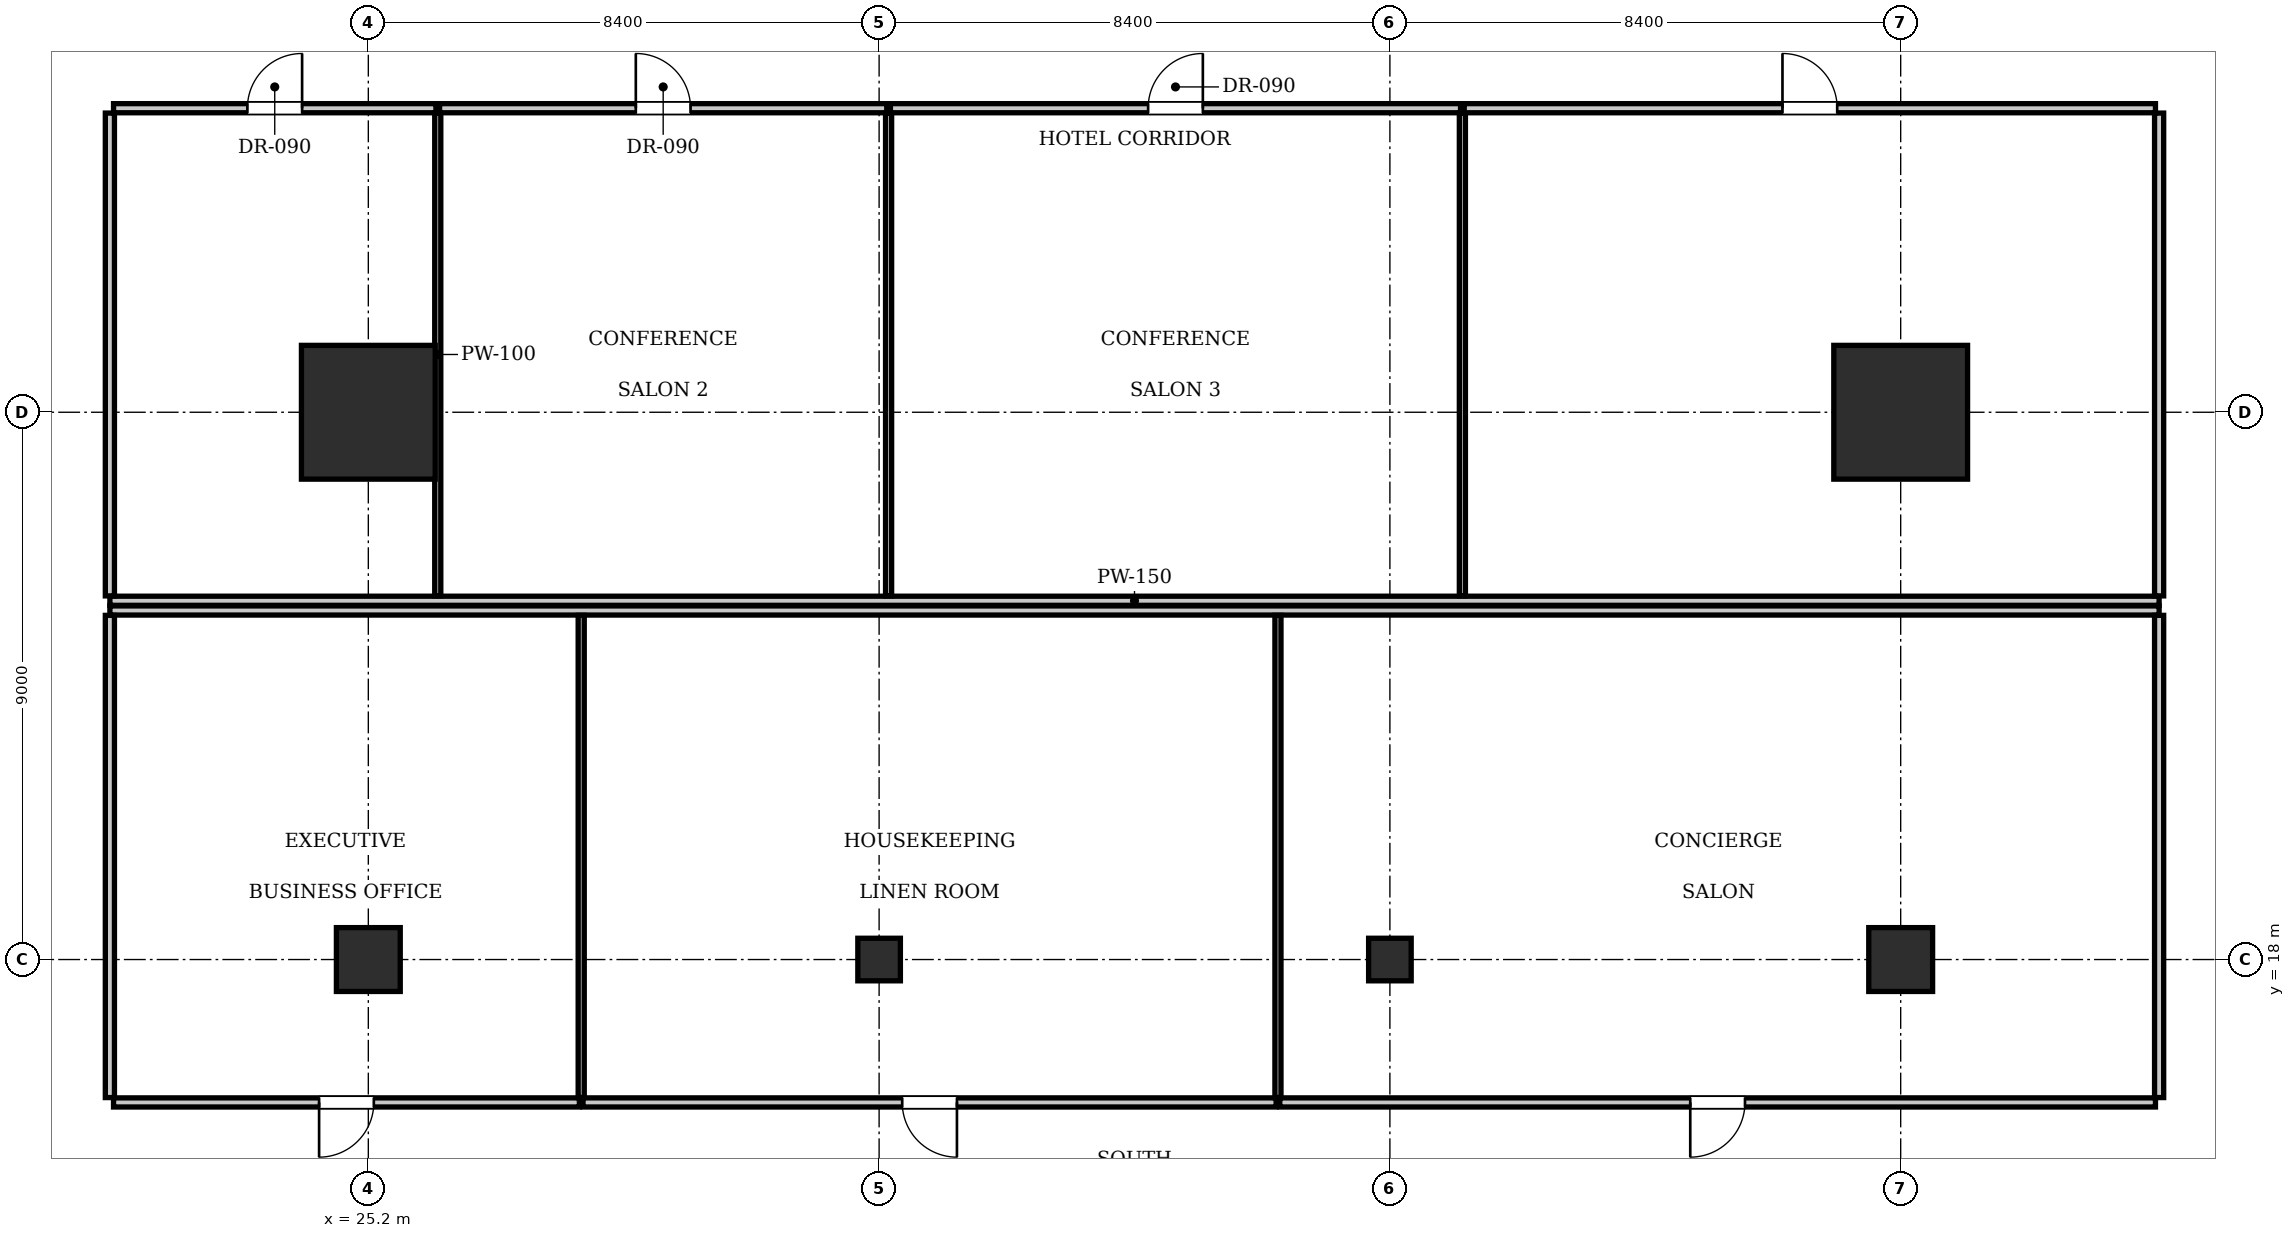
"""IFC4 building model, lengths in metres.
Left out: names, types, materials, properties, quantities, classifications, styles, units other than length and angle.
Written with IfcOpenShell. Run it as: python <this file> out.ifc"""

import sys

from ifc_helpers import new_model, si_unit, direction, frame, frame_2d, origin, origin_2d, place, context, subcontext, project, spatial, rectangle, i_section, extrude, element, fill, save


model = new_model("IFC4")
c1 = context("Model", 3, precision=1e-05, world=origin(), true_north=direction((0.0, 1.0)))
c2 = subcontext(c1, "Body", "Model", "MODEL_VIEW")
j1 = project(units=[si_unit("LENGTHUNIT", "METRE"), si_unit("PLANEANGLEUNIT", "RADIAN")], contexts=[c1])
p1 = place(None, origin())
s1 = spatial("IfcSite", under=j1, at=p1, CompositionType="ELEMENT")
p2 = place(p1, origin())
s2 = spatial("IfcBuilding", under=s1, at=p2, CompositionType="ELEMENT")
p3 = place(p2, frame((0.0, 0.0, 53.9)))
s3 = spatial("IfcBuildingStorey", under=s2, at=p3, CompositionType="ELEMENT", Elevation=53.9)
for number, where, z_axis, x_axis in (
    (1, (25.2, 27.0, 0.0), (0.0, 0.0, 1.0), (1.0, 0.0, 0.0)),
    (2, (50.4, 27.0, 0.0), (0.0, 0.0, 1.0), (1.0, 0.0, 0.0)),
):
    element("IfcColumn", number, at=place(p3, frame(where, z_axis=z_axis, x_axis=x_axis)), inside=s3, PredefinedType="COLUMN", context=c2, shape_type="SweptSolid", body=[
        extrude(rectangle(XDim=2.2, YDim=2.2, at=origin_2d()), origin(), (0.0, 0.0, 1.0), 3.85),
    ])
for number, where, z_axis, x_axis in (
    (3, (25.2, 18.0, 0.0), (0.0, 0.0, 1.0), (1.0, 0.0, 0.0)),
    (4, (50.4, 18.0, 0.0), (0.0, 0.0, 1.0), (1.0, 0.0, 0.0)),
):
    element("IfcColumn", number, at=place(p3, frame(where, z_axis=z_axis, x_axis=x_axis)), inside=s3, PredefinedType="COLUMN", context=c2, shape_type="SweptSolid", body=[
        extrude(rectangle(XDim=1.05, YDim=1.05, at=origin_2d()), origin(), (0.0, 0.0, 1.0), 3.85),
    ])
for number, where, z_axis, x_axis in (
    (5, (33.6, 18.0, 0.0), (0.0, 0.0, 1.0), (1.0, 0.0, 0.0)),
    (6, (42.0, 18.0, 0.0), (0.0, 0.0, 1.0), (1.0, 0.0, 0.0)),
):
    element("IfcColumn", number, at=place(p3, frame(where, z_axis=z_axis, x_axis=x_axis)), inside=s3, PredefinedType="COLUMN", context=c2, shape_type="SweptSolid", body=[
        extrude(i_section(OverallWidth=0.7, OverallDepth=0.7, WebThickness=0.028, FlangeThickness=0.044, at=origin_2d()), origin(), (0.0, 0.0, 1.0), 3.85),
    ])
p4 = place(p3, frame((20.95, 23.9, 0.0), z_axis=(0.0, 0.0, 1.0), x_axis=(1.0, 0.0, 0.0)))
e7 = element("IfcWall", 7, at=p4, inside=s3, PredefinedType="PARTITIONING", context=c2, shape_type="SweptSolid", body=[
    extrude(rectangle(XDim=33.7, YDim=0.15, at=frame_2d((16.85, 0.0))), origin(), (0.0, 0.0, 1.0), 3.61),
])
p5 = place(p3, frame((20.95, 23.98, 0.0), z_axis=(0.0, 0.0, 1.0), x_axis=(0.0, 1.0, 0.0)))
e8 = element("IfcWall", 8, at=p5, inside=s3, PredefinedType="PARTITIONING", context=c2, shape_type="SweptSolid", body=[
    extrude(rectangle(XDim=7.94, YDim=0.15, at=frame_2d((3.97, 0.0))), origin(), (0.0, 0.0, 1.0), 3.207),
])
p6 = place(p3, frame((54.65, 23.98, 0.0), z_axis=(0.0, 0.0, 1.0), x_axis=(0.0, 1.0, 0.0)))
e9 = element("IfcWall", 9, at=p6, inside=s3, PredefinedType="PARTITIONING", context=c2, shape_type="SweptSolid", body=[
    extrude(rectangle(XDim=7.94, YDim=0.15, at=frame_2d((3.97, 0.0))), origin(), (0.0, 0.0, 1.0), 3.255),
])
p7 = place(p3, frame((21.01, 32.0, 0.0), z_axis=(0.0, 0.0, 1.0), x_axis=(1.0, 0.0, 0.0)))
e10 = element("IfcWall", 10, at=p7, inside=s3, PredefinedType="PARTITIONING", context=c2, shape_type="SweptSolid", body=[
    extrude(rectangle(XDim=5.302, YDim=0.15, at=frame_2d((2.651, 0.0))), origin(), (0.0, 0.0, 1.0), 3.61),
])
p8 = place(p7, frame((2.201, 0.0, 0.0)))
e11 = element("IfcOpeningElement", 11, at=p8, cuts=e10, PredefinedType="OPENING", context=c2, shape_type="SweptSolid", body=[
    extrude(rectangle(XDim=0.9, YDim=2.1, at=frame_2d((0.45, 1.05))), frame((0.0, 0.085, 0.0), z_axis=(0.0, -1.0, 0.0), x_axis=(1.0, 0.0, 0.0)), (0.0, 0.0, 1.0), 0.17),
])
p9 = place(p3, frame((26.342, 23.98, 0.0), z_axis=(0.0, 0.0, 1.0), x_axis=(0.0, 1.0, 0.0)))
e12 = element("IfcWall", 12, at=p9, inside=s3, PredefinedType="PARTITIONING", context=c2, shape_type="SweptSolid", body=[
    extrude(rectangle(XDim=7.94, YDim=0.1, at=frame_2d((3.97, 0.0))), origin(), (0.0, 0.0, 1.0), 3.61),
])
p10 = place(p3, frame((26.372, 32.0, 0.0), z_axis=(0.0, 0.0, 1.0), x_axis=(1.0, 0.0, 0.0)))
e13 = element("IfcWall", 13, at=p10, inside=s3, PredefinedType="PARTITIONING", context=c2, shape_type="SweptSolid", body=[
    extrude(rectangle(XDim=7.354, YDim=0.15, at=frame_2d((3.677, 0.0))), origin(), (0.0, 0.0, 1.0), 3.61),
])
p11 = place(p10, frame((3.227, 0.0, 0.0)))
e14 = element("IfcOpeningElement", 14, at=p11, cuts=e13, PredefinedType="OPENING", context=c2, shape_type="SweptSolid", body=[
    extrude(rectangle(XDim=0.9, YDim=2.1, at=frame_2d((0.45, 1.05))), frame((0.0, 0.085, 0.0), z_axis=(0.0, -1.0, 0.0), x_axis=(1.0, 0.0, 0.0)), (0.0, 0.0, 1.0), 0.17),
])
p12 = place(p3, frame((33.756, 23.98, 0.0), z_axis=(0.0, 0.0, 1.0), x_axis=(0.0, 1.0, 0.0)))
e15 = element("IfcWall", 15, at=p12, inside=s3, PredefinedType="PARTITIONING", context=c2, shape_type="SweptSolid", body=[
    extrude(rectangle(XDim=7.94, YDim=0.1, at=frame_2d((3.97, 0.0))), origin(), (0.0, 0.0, 1.0), 2.988),
])
p13 = place(p3, frame((33.786, 32.0, 0.0), z_axis=(0.0, 0.0, 1.0), x_axis=(1.0, 0.0, 0.0)))
e16 = element("IfcWall", 16, at=p13, inside=s3, PredefinedType="PARTITIONING", context=c2, shape_type="SweptSolid", body=[
    extrude(rectangle(XDim=9.376, YDim=0.15, at=frame_2d((4.688, 0.0))), origin(), (0.0, 0.0, 1.0), 3.61),
])
p14 = place(p13, frame((4.238, 0.0, 0.0)))
e17 = element("IfcOpeningElement", 17, at=p14, cuts=e16, PredefinedType="OPENING", context=c2, shape_type="SweptSolid", body=[
    extrude(rectangle(XDim=0.9, YDim=2.1, at=frame_2d((0.45, 1.05))), frame((0.0, 0.085, 0.0), z_axis=(0.0, -1.0, 0.0), x_axis=(1.0, 0.0, 0.0)), (0.0, 0.0, 1.0), 0.17),
])
p15 = place(p3, frame((43.192, 23.98, 0.0), z_axis=(0.0, 0.0, 1.0), x_axis=(0.0, 1.0, 0.0)))
e18 = element("IfcWall", 18, at=p15, inside=s3, PredefinedType="PARTITIONING", context=c2, shape_type="SweptSolid", body=[
    extrude(rectangle(XDim=7.94, YDim=0.1, at=frame_2d((3.97, 0.0))), origin(), (0.0, 0.0, 1.0), 3.61),
])
p16 = place(p3, frame((43.222, 32.0, 0.0), z_axis=(0.0, 0.0, 1.0), x_axis=(1.0, 0.0, 0.0)))
e19 = element("IfcWall", 19, at=p16, inside=s3, PredefinedType="PARTITIONING", context=c2, shape_type="SweptSolid", body=[
    extrude(rectangle(XDim=11.368, YDim=0.15, at=frame_2d((5.684, 0.0))), origin(), (0.0, 0.0, 1.0), 3.61),
])
p17 = place(p16, frame((5.234, 0.0, 0.0)))
e20 = element("IfcOpeningElement", 20, at=p17, cuts=e19, PredefinedType="OPENING", context=c2, shape_type="SweptSolid", body=[
    extrude(rectangle(XDim=0.9, YDim=2.1, at=frame_2d((0.45, 1.05))), frame((0.0, 0.085, 0.0), z_axis=(0.0, -1.0, 0.0), x_axis=(1.0, 0.0, 0.0)), (0.0, 0.0, 1.0), 0.17),
])
p18 = place(p3, frame((20.95, 23.74, 0.0), z_axis=(0.0, 0.0, 1.0), x_axis=(1.0, 0.0, 0.0)))
e21 = element("IfcWall", 21, at=p18, inside=s3, PredefinedType="PARTITIONING", context=c2, shape_type="SweptSolid", body=[
    extrude(rectangle(XDim=33.7, YDim=0.15, at=frame_2d((16.85, 0.0))), origin(), (0.0, 0.0, 1.0), 3.61),
])
for number, where, z_axis, x_axis in (
    (22, (20.95, 15.73, 0.0), (0.0, 0.0, 1.0), (0.0, 1.0, 0.0)),
    (23, (54.65, 15.73, 0.0), (0.0, 0.0, 1.0), (0.0, 1.0, 0.0)),
):
    element("IfcWall", number, at=place(p3, frame(where, z_axis=z_axis, x_axis=x_axis)), inside=s3, PredefinedType="PARTITIONING", context=c2, shape_type="SweptSolid", body=[
        extrude(rectangle(XDim=7.93, YDim=0.15, at=frame_2d((3.965, 0.0))), origin(), (0.0, 0.0, 1.0), 3.207),
    ])
p19 = place(p3, frame((21.01, 15.65, 0.0), z_axis=(0.0, 0.0, 1.0), x_axis=(1.0, 0.0, 0.0)))
e24 = element("IfcWall", 24, at=p19, inside=s3, PredefinedType="PARTITIONING", context=c2, shape_type="SweptSolid", body=[
    extrude(rectangle(XDim=7.661, YDim=0.15, at=frame_2d((3.831, 0.0))), origin(), (0.0, 0.0, 1.0), 3.61),
])
p20 = place(p19, frame((3.381, 0.0, 0.0)))
e25 = element("IfcOpeningElement", 25, at=p20, cuts=e24, PredefinedType="OPENING", context=c2, shape_type="SweptSolid", body=[
    extrude(rectangle(XDim=0.9, YDim=2.1, at=frame_2d((0.45, 1.05))), frame((0.0, 0.085, 0.0), z_axis=(0.0, -1.0, 0.0), x_axis=(1.0, 0.0, 0.0)), (0.0, 0.0, 1.0), 0.17),
])
p21 = place(p3, frame((28.701, 15.73, 0.0), z_axis=(0.0, 0.0, 1.0), x_axis=(0.0, 1.0, 0.0)))
e26 = element("IfcWall", 26, at=p21, inside=s3, PredefinedType="PARTITIONING", context=c2, shape_type="SweptSolid", body=[
    extrude(rectangle(XDim=7.93, YDim=0.1, at=frame_2d((3.965, 0.0))), origin(), (0.0, 0.0, 1.0), 3.61),
])
p22 = place(p3, frame((28.731, 15.65, 0.0), z_axis=(0.0, 0.0, 1.0), x_axis=(1.0, 0.0, 0.0)))
e27 = element("IfcWall", 27, at=p22, inside=s3, PredefinedType="PARTITIONING", context=c2, shape_type="SweptSolid", body=[
    extrude(rectangle(XDim=11.398, YDim=0.15, at=frame_2d((5.699, 0.0))), origin(), (0.0, 0.0, 1.0), 3.61),
])
p23 = place(p22, frame((5.249, 0.0, 0.0)))
e28 = element("IfcOpeningElement", 28, at=p23, cuts=e27, PredefinedType="OPENING", context=c2, shape_type="SweptSolid", body=[
    extrude(rectangle(XDim=0.9, YDim=2.1, at=frame_2d((0.45, 1.05))), frame((0.0, 0.085, 0.0), z_axis=(0.0, -1.0, 0.0), x_axis=(1.0, 0.0, 0.0)), (0.0, 0.0, 1.0), 0.17),
])
p24 = place(p3, frame((40.159, 15.73, 0.0), z_axis=(0.0, 0.0, 1.0), x_axis=(0.0, 1.0, 0.0)))
e29 = element("IfcWall", 29, at=p24, inside=s3, PredefinedType="PARTITIONING", context=c2, shape_type="SweptSolid", body=[
    extrude(rectangle(XDim=7.93, YDim=0.1, at=frame_2d((3.965, 0.0))), origin(), (0.0, 0.0, 1.0), 3.61),
])
p25 = place(p3, frame((40.189, 15.65, 0.0), z_axis=(0.0, 0.0, 1.0), x_axis=(1.0, 0.0, 0.0)))
e30 = element("IfcWall", 30, at=p25, inside=s3, PredefinedType="PARTITIONING", context=c2, shape_type="SweptSolid", body=[
    extrude(rectangle(XDim=14.401, YDim=0.15, at=frame_2d((7.201, 0.0))), origin(), (0.0, 0.0, 1.0), 3.61),
])
p26 = place(p25, frame((6.75, 0.0, 0.0)))
e31 = element("IfcOpeningElement", 31, at=p26, cuts=e30, PredefinedType="OPENING", context=c2, shape_type="SweptSolid", body=[
    extrude(rectangle(XDim=0.9, YDim=2.1, at=frame_2d((0.45, 1.05))), frame((0.0, 0.085, 0.0), z_axis=(0.0, -1.0, 0.0), x_axis=(1.0, 0.0, 0.0)), (0.0, 0.0, 1.0), 0.17),
])
p27 = place(p8, origin())
e32 = element("IfcDoor", 32, at=p27, inside=s3, OperationType="SINGLE_SWING_RIGHT", PredefinedType="DOOR", context=c2, shape_type="SweptSolid", body=[
    extrude(rectangle(XDim=0.9, YDim=2.1, at=frame_2d((0.45, 1.05))), frame((0.0, 0.025, 0.0), z_axis=(0.0, -1.0, 0.0), x_axis=(1.0, 0.0, 0.0)), (0.0, 0.0, 1.0), 0.05),
])
fill(e11, e32)
p28 = place(p11, origin())
e33 = element("IfcDoor", 33, at=p28, inside=s3, OperationType="SINGLE_SWING_LEFT", PredefinedType="DOOR", context=c2, shape_type="SweptSolid", body=[
    extrude(rectangle(XDim=0.9, YDim=2.1, at=frame_2d((0.45, 1.05))), frame((0.0, 0.025, 0.0), z_axis=(0.0, -1.0, 0.0), x_axis=(1.0, 0.0, 0.0)), (0.0, 0.0, 1.0), 0.05),
])
fill(e14, e33)
p29 = place(p14, origin())
e34 = element("IfcDoor", 34, at=p29, inside=s3, OperationType="SINGLE_SWING_RIGHT", PredefinedType="DOOR", context=c2, shape_type="SweptSolid", body=[
    extrude(rectangle(XDim=0.9, YDim=2.1, at=frame_2d((0.45, 1.05))), frame((0.0, 0.025, 0.0), z_axis=(0.0, -1.0, 0.0), x_axis=(1.0, 0.0, 0.0)), (0.0, 0.0, 1.0), 0.05),
])
fill(e17, e34)
p30 = place(p17, origin())
e35 = element("IfcDoor", 35, at=p30, inside=s3, OperationType="SINGLE_SWING_LEFT", PredefinedType="DOOR", context=c2, shape_type="SweptSolid", body=[
    extrude(rectangle(XDim=0.9, YDim=2.1, at=frame_2d((0.45, 1.05))), frame((0.0, 0.025, 0.0), z_axis=(0.0, -1.0, 0.0), x_axis=(1.0, 0.0, 0.0)), (0.0, 0.0, 1.0), 0.05),
])
fill(e20, e35)
p31 = place(p20, frame((0.9, 0.0, 0.0), z_axis=(0.0, 0.0, 1.0), x_axis=(-1.0, 0.0, 0.0)))
e36 = element("IfcDoor", 36, at=p31, inside=s3, OperationType="SINGLE_SWING_RIGHT", PredefinedType="DOOR", context=c2, shape_type="SweptSolid", body=[
    extrude(rectangle(XDim=0.9, YDim=2.1, at=frame_2d((0.45, 1.05))), frame((0.0, 0.025, 0.0), z_axis=(0.0, -1.0, 0.0), x_axis=(1.0, 0.0, 0.0)), (0.0, 0.0, 1.0), 0.05),
])
fill(e25, e36)
p32 = place(p23, frame((0.9, 0.0, 0.0), z_axis=(0.0, 0.0, 1.0), x_axis=(-1.0, 0.0, 0.0)))
e37 = element("IfcDoor", 37, at=p32, inside=s3, OperationType="SINGLE_SWING_LEFT", PredefinedType="DOOR", context=c2, shape_type="SweptSolid", body=[
    extrude(rectangle(XDim=0.9, YDim=2.1, at=frame_2d((0.45, 1.05))), frame((0.0, 0.025, 0.0), z_axis=(0.0, -1.0, 0.0), x_axis=(1.0, 0.0, 0.0)), (0.0, 0.0, 1.0), 0.05),
])
fill(e28, e37)
p33 = place(p26, frame((0.9, 0.0, 0.0), z_axis=(0.0, 0.0, 1.0), x_axis=(-1.0, 0.0, 0.0)))
e38 = element("IfcDoor", 38, at=p33, inside=s3, OperationType="SINGLE_SWING_RIGHT", PredefinedType="DOOR", context=c2, shape_type="SweptSolid", body=[
    extrude(rectangle(XDim=0.9, YDim=2.1, at=frame_2d((0.45, 1.05))), frame((0.0, 0.025, 0.0), z_axis=(0.0, -1.0, 0.0), x_axis=(1.0, 0.0, 0.0)), (0.0, 0.0, 1.0), 0.05),
])
fill(e31, e38)
save(model, sys.argv[1])
